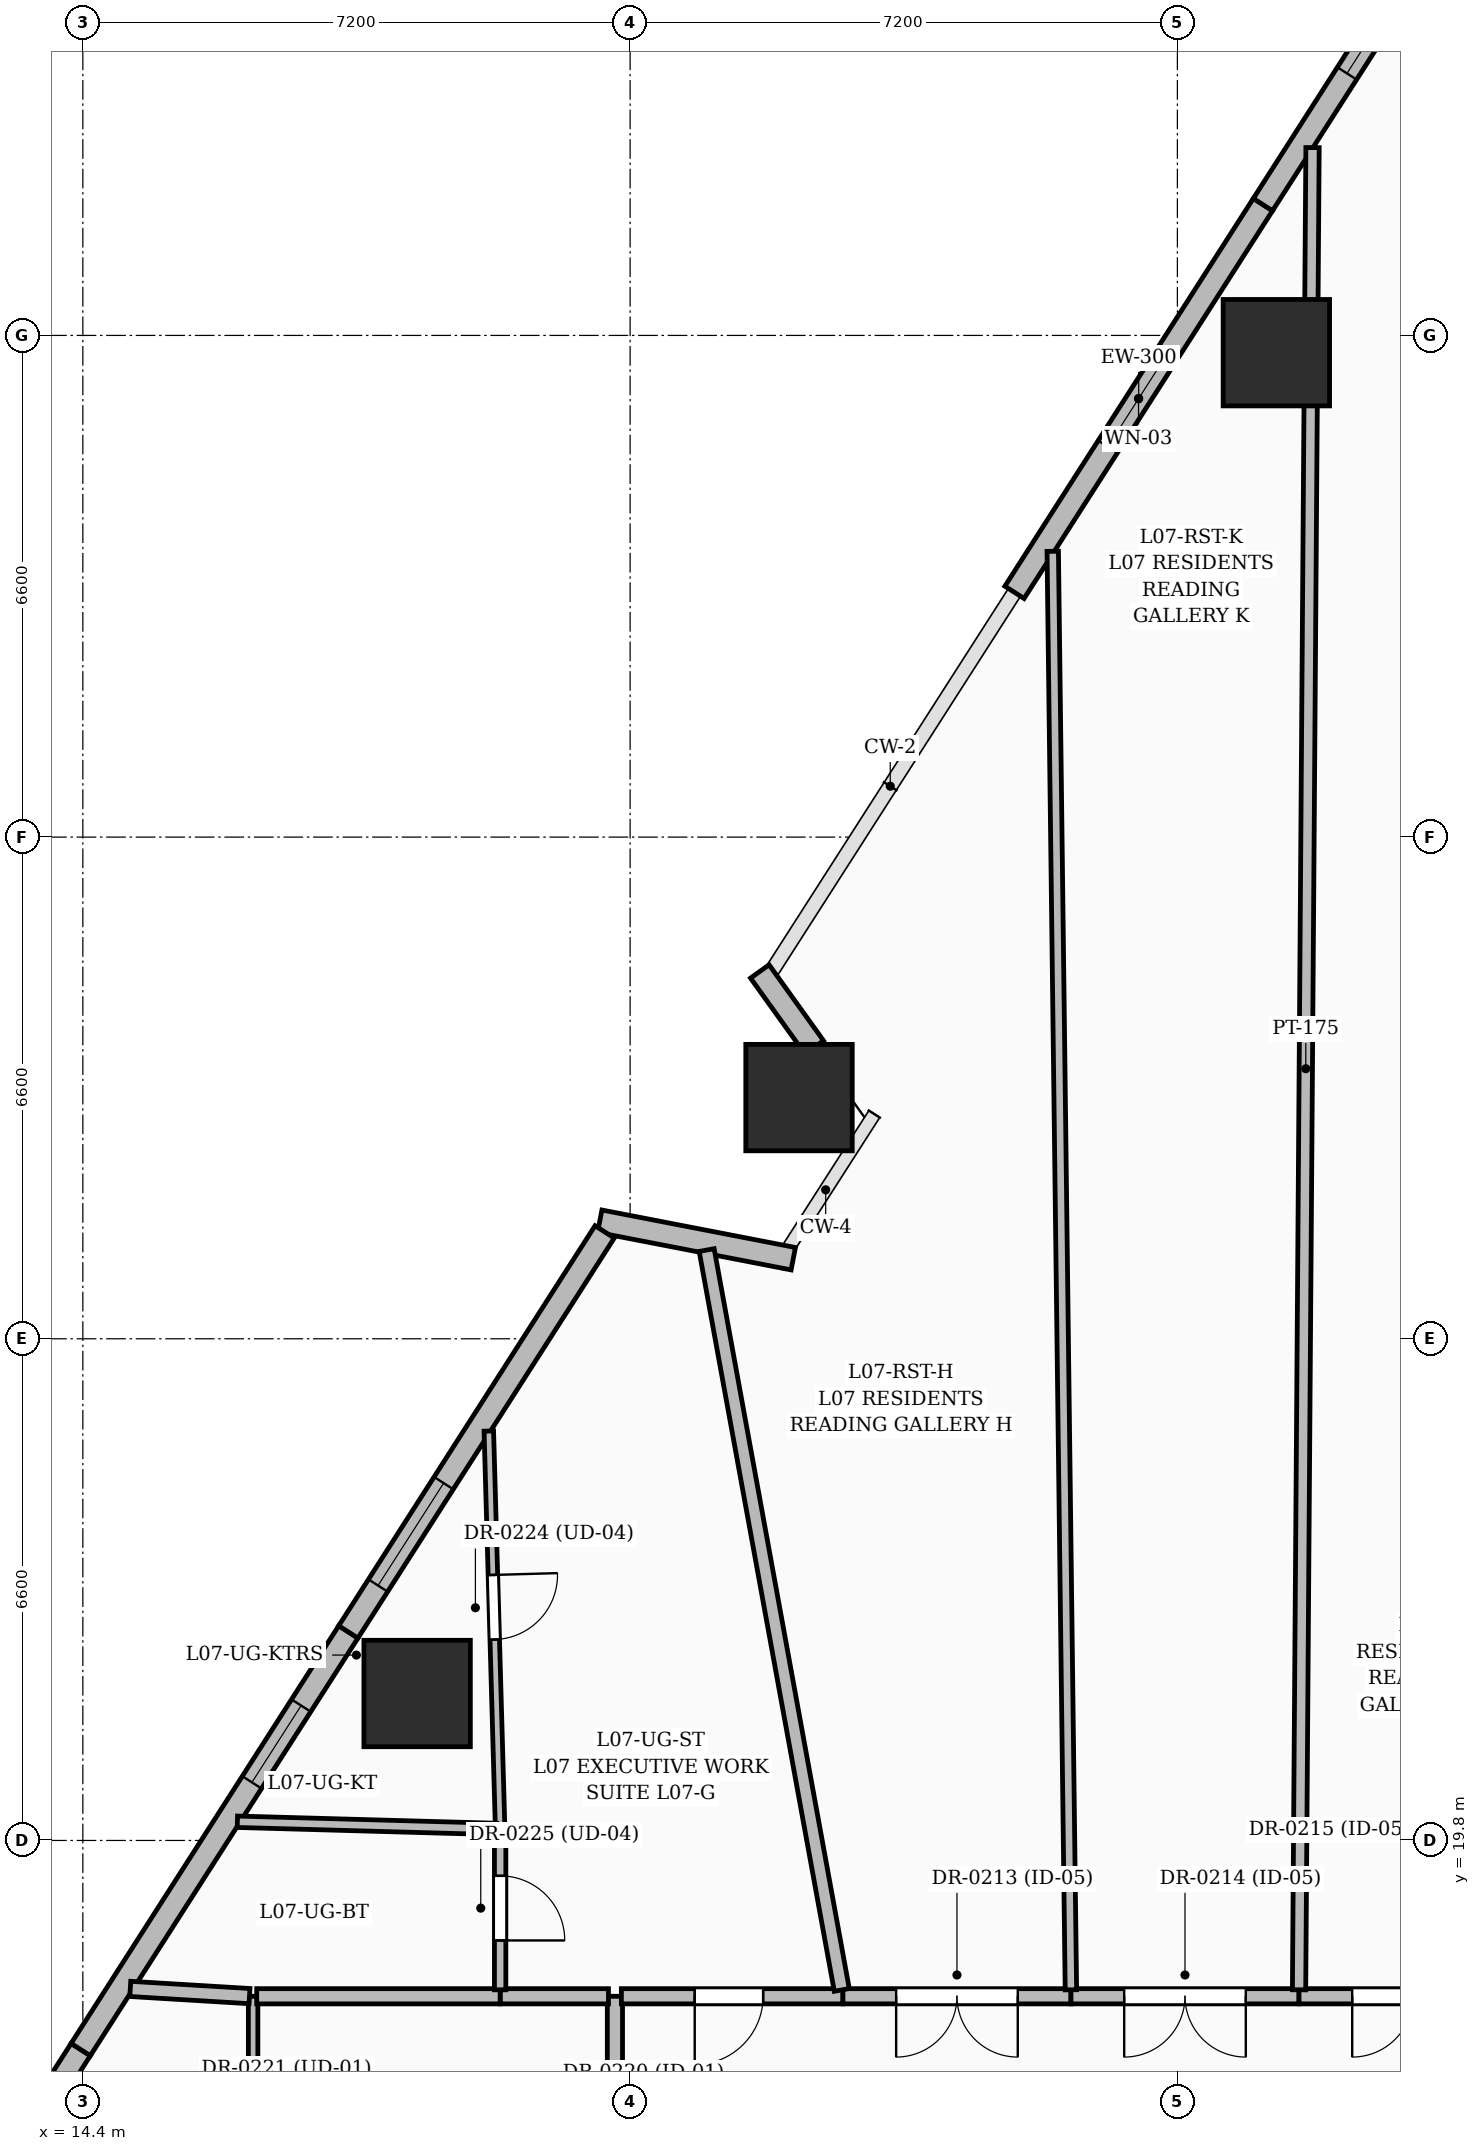
"""IFC4 building model, lengths in metres.
Left out: names, types, materials, properties, quantities, classifications, styles, units other than length and angle.
Written with IfcOpenShell. Run it as: python <this file> out.ifc"""

import sys

from ifc_helpers import new_model, si_unit, direction, frame, frame_2d, origin, origin_2d, place, context, subcontext, project, spatial, rectangle, extrude, element, fill, save


model = new_model("IFC4")
c1 = context("Model", 3, precision=1e-05, world=origin(), true_north=direction((0.0, 1.0)))
c2 = subcontext(c1, "Body", "Model", "MODEL_VIEW")
j1 = project(units=[si_unit("LENGTHUNIT", "METRE"), si_unit("PLANEANGLEUNIT", "RADIAN")], contexts=[c1])
p1 = place(None, origin())
s1 = spatial("IfcSite", under=j1, at=p1, CompositionType="ELEMENT")
p2 = place(p1, origin())
s2 = spatial("IfcBuilding", under=s1, at=p2, CompositionType="ELEMENT")
p3 = place(p2, frame((0.0, 0.0, 35.4)))
s3 = spatial("IfcBuildingStorey", under=s2, at=p3, CompositionType="ELEMENT", Elevation=35.4)
for number, where, z_axis, x_axis in (
    (1, (30.102, 39.373, 0.0), (0.0, 0.0, 1.0), (1.0, 0.0, 0.0)),
    (2, (23.822, 29.573, 0.0), (0.0, 0.0, 1.0), (1.0, 0.0, 0.0)),
    (3, (18.798, 21.733, 0.0), (0.0, 0.0, 1.0), (1.0, 0.0, 0.0)),
):
    element("IfcColumn", number, at=place(p3, frame(where, z_axis=z_axis, x_axis=x_axis)), inside=s3, PredefinedType="COLUMN", context=c2, shape_type="SweptSolid", body=[
        extrude(rectangle(XDim=1.4, YDim=1.4, at=origin_2d()), origin(), (0.0, 0.0, 1.0), 3.6),
    ])
p4 = place(p3, frame((21.201, 27.947, 0.0), z_axis=(0.0, 0.0, 1.0), x_axis=(0.981746971615, -0.190191702567, 0.0)))
e4 = element("IfcWall", 4, at=p4, inside=s3, PredefinedType="SOLIDWALL", context=c2, shape_type="SweptSolid", body=[
    extrude(rectangle(XDim=2.593, YDim=0.3, at=frame_2d((1.296, 0.0))), origin(), (0.0, 0.0, 1.0), 2.375),
])
p5 = place(p3, frame((24.022, 30.235, 0.0), z_axis=(0.0, 0.0, 1.0), x_axis=(-0.583004903736, 0.812468634607, 0.0)))
e5 = element("IfcWall", 5, at=p5, inside=s3, PredefinedType="SOLIDWALL", context=c2, shape_type="SweptSolid", body=[
    extrude(rectangle(XDim=1.228, YDim=0.3, at=frame_2d((0.614, 0.0))), origin(), (0.0, 0.0, 1.0), 2.375),
])
p6 = place(p3, frame((26.657, 36.22, 0.0), z_axis=(0.0, 0.0, 1.0), x_axis=(0.539506453767, 0.841981464371, 0.0)))
e6 = element("IfcWall", 6, at=p6, inside=s3, PredefinedType="SOLIDWALL", context=c2, shape_type="SweptSolid", body=[
    extrude(rectangle(XDim=6.058, YDim=0.3, at=frame_2d((3.029, 0.0))), origin(), (0.0, 0.0, 1.0), 3.35),
])
p7 = place(p6, frame((2.275, 0.0, 0.6)))
e7 = element("IfcOpeningElement", 7, at=p7, cuts=e6, PredefinedType="OPENING", context=c2, shape_type="SweptSolid", body=[
    extrude(rectangle(XDim=1.5, YDim=2.1, at=frame_2d((0.75, 1.05))), frame((0.0, 0.16, 0.0), z_axis=(0.0, -1.0, 0.0), x_axis=(1.0, 0.0, 0.0)), (0.0, 0.0, 1.0), 0.32),
])
p8 = place(p3, frame((29.925, 41.321, 0.0), z_axis=(0.0, 0.0, 1.0), x_axis=(0.53953502124, 0.841963158847, 0.0)))
e8 = element("IfcWall", 8, at=p8, inside=s3, PredefinedType="SOLIDWALL", context=c2, shape_type="SweptSolid", body=[
    extrude(rectangle(XDim=6.059, YDim=0.3, at=frame_2d((3.029, 0.0))), origin(), (0.0, 0.0, 1.0), 3.35),
])
p9 = place(p8, frame((2.05, 0.0, 0.8)))
e9 = element("IfcOpeningElement", 9, at=p9, cuts=e8, PredefinedType="OPENING", context=c2, shape_type="SweptSolid", body=[
    extrude(rectangle(XDim=1.2, YDim=1.8, at=frame_2d((0.6, 0.9))), frame((0.0, 0.16, 0.0), z_axis=(0.0, -1.0, 0.0), x_axis=(1.0, 0.0, 0.0)), (0.0, 0.0, 1.0), 0.32),
])
p10 = place(p3, frame((10.851, 11.555, 0.0), z_axis=(0.0, 0.0, 1.0), x_axis=(0.539526045631, 0.841968910403, 0.0)))
e10 = element("IfcWall", 10, at=p10, inside=s3, PredefinedType="SOLIDWALL", context=c2, shape_type="SweptSolid", body=[
    extrude(rectangle(XDim=6.526, YDim=0.3, at=frame_2d((3.263, 0.0))), origin(), (0.0, 0.0, 1.0), 3.35),
])
p11 = place(p10, frame((2.1, 0.0, 0.55)))
e11 = element("IfcOpeningElement", 11, at=p11, cuts=e10, PredefinedType="OPENING", context=c2, shape_type="SweptSolid", body=[
    extrude(rectangle(XDim=2.1, YDim=2.4, at=frame_2d((1.05, 1.2))), frame((0.0, 0.16, 0.0), z_axis=(0.0, -1.0, 0.0), x_axis=(1.0, 0.0, 0.0)), (0.0, 0.0, 1.0), 0.32),
])
p12 = place(p3, frame((14.372, 17.049, 0.0), z_axis=(0.0, 0.0, 1.0), x_axis=(0.539499522652, 0.841985905498, 0.0)))
e12 = element("IfcWall", 12, at=p12, inside=s3, PredefinedType="SOLIDWALL", context=c2, shape_type="SweptSolid", body=[
    extrude(rectangle(XDim=6.525, YDim=0.3, at=frame_2d((3.263, 0.0))), origin(), (0.0, 0.0, 1.0), 3.35),
])
p13 = place(p12, frame((4.175, 0.0, 0.8)))
e13 = element("IfcOpeningElement", 13, at=p13, cuts=e12, PredefinedType="OPENING", context=c2, shape_type="SweptSolid", body=[
    extrude(rectangle(XDim=1.2, YDim=1.8, at=frame_2d((0.6, 0.9))), frame((0.0, 0.16, 0.0), z_axis=(0.0, -1.0, 0.0), x_axis=(1.0, 0.0, 0.0)), (0.0, 0.0, 1.0), 0.32),
])
p14 = place(p3, frame((17.893, 22.543, 0.0), z_axis=(0.0, 0.0, 1.0), x_axis=(0.539539053693, 0.841960574813, 0.0)))
e14 = element("IfcWall", 14, at=p14, inside=s3, PredefinedType="SOLIDWALL", context=c2, shape_type="SweptSolid", body=[
    extrude(rectangle(XDim=6.251, YDim=0.3, at=frame_2d((3.125, 0.0))), origin(), (0.0, 0.0, 1.0), 3.35),
])
p15 = place(p14, frame((0.725, 0.0, 0.55)))
e15 = element("IfcOpeningElement", 15, at=p15, cuts=e14, PredefinedType="OPENING", context=c2, shape_type="SweptSolid", body=[
    extrude(rectangle(XDim=1.6, YDim=2.2, at=frame_2d((0.8, 1.1))), frame((0.0, 0.16, 0.0), z_axis=(0.0, -1.0, 0.0), x_axis=(1.0, 0.0, 0.0)), (0.0, 0.0, 1.0), 0.32),
])
p16 = place(p3, frame((21.4, 17.75, 0.0), z_axis=(0.0, 0.0, 1.0), x_axis=(0.0, -1.0, 0.0)))
e16 = element("IfcWall", 16, at=p16, inside=s3, PredefinedType="PARTITIONING", context=c2, shape_type="SweptSolid", body=[
    extrude(rectangle(XDim=4.17, YDim=0.2, at=frame_2d((2.085, 0.0))), origin(), (0.0, 0.0, 1.0), 2.712),
])
p17 = place(p16, frame((1.643, 0.0, 0.0)))
e17 = element("IfcOpeningElement", 17, at=p17, cuts=e16, PredefinedType="OPENING", context=c2, shape_type="SweptSolid", body=[
    extrude(rectangle(XDim=1.0, YDim=2.2, at=frame_2d((0.5, 1.1))), frame((0.0, 0.11, 0.0), z_axis=(0.0, -1.0, 0.0), x_axis=(1.0, 0.0, 0.0)), (0.0, 0.0, 1.0), 0.22),
])
p18 = place(p3, frame((24.4, 17.75, 0.0), z_axis=(0.0, 0.0, 1.0), x_axis=(-1.0, 0.0, 0.0)))
e18 = element("IfcWall", 18, at=p18, inside=s3, PredefinedType="PARTITIONING", context=c2, shape_type="SweptSolid", body=[
    extrude(rectangle(XDim=2.915, YDim=0.2, at=frame_2d((1.458, 0.0))), origin(), (0.0, 0.0, 1.0), 2.228),
])
p19 = place(p18, frame((1.05, 0.0, 0.0)))
e19 = element("IfcOpeningElement", 19, at=p19, cuts=e18, PredefinedType="OPENING", context=c2, shape_type="SweptSolid", body=[
    extrude(rectangle(XDim=0.9, YDim=2.1, at=frame_2d((0.45, 1.05))), frame((0.0, 0.11, 0.0), z_axis=(0.0, -1.0, 0.0), x_axis=(1.0, 0.0, 0.0)), (0.0, 0.0, 1.0), 0.22),
])
p20 = place(p3, frame((27.4, 17.75, 0.0), z_axis=(0.0, 0.0, 1.0), x_axis=(-1.0, 0.0, 0.0)))
e20 = element("IfcWall", 20, at=p20, inside=s3, PredefinedType="PARTITIONING", context=c2, shape_type="SweptSolid", body=[
    extrude(rectangle(XDim=3.0, YDim=0.2, at=frame_2d((1.5, 0.0))), origin(), (0.0, 0.0, 1.0), 2.712),
])
p21 = place(p20, frame((0.7, 0.0, 0.0)))
e21 = element("IfcOpeningElement", 21, at=p21, cuts=e20, PredefinedType="OPENING", context=c2, shape_type="SweptSolid", body=[
    extrude(rectangle(XDim=1.6, YDim=2.3, at=frame_2d((0.8, 1.15))), frame((0.0, 0.11, 0.0), z_axis=(0.0, -1.0, 0.0), x_axis=(1.0, 0.0, 0.0)), (0.0, 0.0, 1.0), 0.22),
])
p22 = place(p3, frame((30.4, 17.75, 0.0), z_axis=(0.0, 0.0, 1.0), x_axis=(-1.0, 0.0, 0.0)))
e22 = element("IfcWall", 22, at=p22, inside=s3, PredefinedType="PARTITIONING", context=c2, shape_type="SweptSolid", body=[
    extrude(rectangle(XDim=3.0, YDim=0.2, at=frame_2d((1.5, 0.0))), origin(), (0.0, 0.0, 1.0), 3.35),
])
p23 = place(p22, frame((0.7, 0.0, 0.0)))
e23 = element("IfcOpeningElement", 23, at=p23, cuts=e22, PredefinedType="OPENING", context=c2, shape_type="SweptSolid", body=[
    extrude(rectangle(XDim=1.6, YDim=2.3, at=frame_2d((0.8, 1.15))), frame((0.0, 0.11, 0.0), z_axis=(0.0, -1.0, 0.0), x_axis=(1.0, 0.0, 0.0)), (0.0, 0.0, 1.0), 0.22),
])
p24 = place(p3, frame((33.4, 17.75, 0.0), z_axis=(0.0, 0.0, 1.0), x_axis=(-1.0, 0.0, 0.0)))
e24 = element("IfcWall", 24, at=p24, inside=s3, PredefinedType="PARTITIONING", context=c2, shape_type="SweptSolid", body=[
    extrude(rectangle(XDim=3.0, YDim=0.2, at=frame_2d((1.5, 0.0))), origin(), (0.0, 0.0, 1.0), 3.35),
])
p25 = place(p24, frame((0.7, 0.0, 0.0)))
e25 = element("IfcOpeningElement", 25, at=p25, cuts=e24, PredefinedType="OPENING", context=c2, shape_type="SweptSolid", body=[
    extrude(rectangle(XDim=1.6, YDim=2.3, at=frame_2d((0.8, 1.15))), frame((0.0, 0.11, 0.0), z_axis=(0.0, -1.0, 0.0), x_axis=(1.0, 0.0, 0.0)), (0.0, 0.0, 1.0), 0.22),
])
p26 = place(p3, frame((16.64, 17.75, 0.0), z_axis=(0.0, 0.0, 1.0), x_axis=(0.0, -1.0, 0.0)))
e26 = element("IfcWall", 26, at=p26, inside=s3, PredefinedType="PARTITIONING", context=c2, shape_type="SweptSolid", body=[
    extrude(rectangle(XDim=4.11, YDim=0.125, at=frame_2d((2.055, 0.0))), origin(), (0.0, 0.0, 1.0), 3.35),
])
p27 = place(p26, frame((1.669, 0.0, 0.0)))
e27 = element("IfcOpeningElement", 27, at=p27, cuts=e26, PredefinedType="OPENING", context=c2, shape_type="SweptSolid", body=[
    extrude(rectangle(XDim=0.95, YDim=2.2, at=frame_2d((0.475, 1.1))), frame((0.0, 0.072, 0.0), z_axis=(0.0, -1.0, 0.0), x_axis=(1.0, 0.0, 0.0)), (0.0, 0.0, 1.0), 0.145),
])
p28 = place(p3, frame((21.315, 17.75, 0.0), z_axis=(0.0, 0.0, 1.0), x_axis=(-1.0, 0.0, 0.0)))
e28 = element("IfcWall", 28, at=p28, inside=s3, PredefinedType="PARTITIONING", context=c2, shape_type="SweptSolid", body=[
    extrude(rectangle(XDim=1.425, YDim=0.2, at=frame_2d((0.712, 0.0))), origin(), (0.0, 0.0, 1.0), 2.712),
])
p29 = place(p3, frame((19.89, 17.75, 0.0), z_axis=(0.0, 0.0, 1.0), x_axis=(-1.0, 0.0, 0.0)))
e29 = element("IfcWall", 29, at=p29, inside=s3, PredefinedType="PARTITIONING", context=c2, shape_type="SweptSolid", body=[
    extrude(rectangle(XDim=3.202, YDim=0.2, at=frame_2d((1.601, 0.0))), origin(), (0.0, 0.0, 1.0), 3.35),
])
p30 = place(p3, frame((16.593, 17.752, 0.0), z_axis=(0.0, 0.0, 1.0), x_axis=(-0.998181550188, 0.060279290502, 0.0)))
e30 = element("IfcWall", 30, at=p30, inside=s3, PredefinedType="PARTITIONING", context=c2, shape_type="SweptSolid", body=[
    extrude(rectangle(XDim=1.572, YDim=0.2, at=frame_2d((0.786, 0.0))), origin(), (0.0, 0.0, 1.0), 2.37),
])
p31 = place(p3, frame((19.741, 25.186, 0.0), z_axis=(0.0, 0.0, 1.0), x_axis=(0.028430709053, -0.999595765689, 0.0)))
e31 = element("IfcWall", 31, at=p31, inside=s3, PredefinedType="PARTITIONING", context=c2, shape_type="SweptSolid", body=[
    extrude(rectangle(XDim=5.238, YDim=0.125, at=frame_2d((2.619, 0.0))), origin(), (0.0, 0.0, 1.0), 2.228),
])
p32 = place(p31, frame((1.894, 0.0, 0.0)))
e32 = element("IfcOpeningElement", 32, at=p32, cuts=e31, PredefinedType="OPENING", context=c2, shape_type="SweptSolid", body=[
    extrude(rectangle(XDim=0.85, YDim=2.1, at=frame_2d((0.425, 1.05))), frame((0.0, 0.072, 0.0), z_axis=(0.0, -1.0, 0.0), x_axis=(1.0, 0.0, 0.0)), (0.0, 0.0, 1.0), 0.145),
])
p33 = place(p3, frame((19.89, 19.95, 0.0), z_axis=(0.0, 0.0, 1.0), x_axis=(0.0, -1.0, 0.0)))
e33 = element("IfcWall", 33, at=p33, inside=s3, PredefinedType="PARTITIONING", context=c2, shape_type="SweptSolid", body=[
    extrude(rectangle(XDim=2.115, YDim=0.15, at=frame_2d((1.058, 0.0))), origin(), (0.0, 0.0, 1.0), 3.35),
])
p34 = place(p33, frame((0.615, 0.0, 0.0)))
e34 = element("IfcOpeningElement", 34, at=p34, cuts=e33, PredefinedType="OPENING", context=c2, shape_type="SweptSolid", body=[
    extrude(rectangle(XDim=0.85, YDim=2.1, at=frame_2d((0.425, 1.05))), frame((0.0, 0.085, 0.0), z_axis=(0.0, -1.0, 0.0), x_axis=(1.0, 0.0, 0.0)), (0.0, 0.0, 1.0), 0.17),
])
p35 = place(p3, frame((24.385, 17.833, 0.0), z_axis=(0.0, 0.0, 1.0), x_axis=(-0.179680097859, 0.98372509495, 0.0)))
e35 = element("IfcWall", 35, at=p35, inside=s3, PredefinedType="PARTITIONING", context=c2, shape_type="SweptSolid", body=[
    extrude(rectangle(XDim=9.895, YDim=0.2, at=frame_2d((4.947, 0.0))), origin(), (0.0, 0.0, 1.0), 2.37),
])
p36 = place(p3, frame((16.433, 20.046, 0.0), z_axis=(0.0, 0.0, 1.0), x_axis=(0.999614255068, -0.027773027638, 0.0)))
e36 = element("IfcWall", 36, at=p36, inside=s3, PredefinedType="PARTITIONING", context=c2, shape_type="SweptSolid", body=[
    extrude(rectangle(XDim=3.411, YDim=0.15, at=frame_2d((1.705, 0.0))), origin(), (0.0, 0.0, 1.0), 2.37),
])
p37 = place(p3, frame((27.399, 17.835, 0.0), z_axis=(0.0, 0.0, 1.0), x_axis=(-0.012641377926, 0.99992009459, 0.0)))
e37 = element("IfcWall", 37, at=p37, inside=s3, PredefinedType="PARTITIONING", context=c2, shape_type="SweptSolid", body=[
    extrude(rectangle(XDim=18.927, YDim=0.15, at=frame_2d((9.463, 0.0))), origin(), (0.0, 0.0, 1.0), 2.228),
])
p38 = place(p3, frame((30.401, 17.835, 0.0), z_axis=(0.0, 0.0, 1.0), x_axis=(0.007313118493, 0.999973258791, 0.0)))
e38 = element("IfcWall", 38, at=p38, inside=s3, PredefinedType="PARTITIONING", context=c2, shape_type="SweptSolid", body=[
    extrude(rectangle(XDim=24.237, YDim=0.175, at=frame_2d((12.118, 0.0))), origin(), (0.0, 0.0, 1.0), 2.228),
])
p39 = place(p7, origin())
e39 = element("IfcWindow", 39, at=p39, inside=s3, PartitioningType="SINGLE_PANEL", PredefinedType="WINDOW", context=c2, shape_type="SweptSolid", body=[
    extrude(rectangle(XDim=1.5, YDim=2.1, at=frame_2d((0.75, 1.05))), frame((0.0, 0.03, 0.0), z_axis=(0.0, -1.0, 0.0), x_axis=(1.0, 0.0, 0.0)), (0.0, 0.0, 1.0), 0.06),
])
fill(e7, e39)
p40 = place(p9, origin())
e40 = element("IfcWindow", 40, at=p40, inside=s3, PartitioningType="SINGLE_PANEL", PredefinedType="WINDOW", context=c2, shape_type="SweptSolid", body=[
    extrude(rectangle(XDim=1.2, YDim=1.8, at=frame_2d((0.6, 0.9))), frame((0.0, 0.03, 0.0), z_axis=(0.0, -1.0, 0.0), x_axis=(1.0, 0.0, 0.0)), (0.0, 0.0, 1.0), 0.06),
])
fill(e9, e40)
p41 = place(p13, origin())
e41 = element("IfcWindow", 41, at=p41, inside=s3, PartitioningType="SINGLE_PANEL", PredefinedType="WINDOW", context=c2, shape_type="SweptSolid", body=[
    extrude(rectangle(XDim=1.2, YDim=1.8, at=frame_2d((0.6, 0.9))), frame((0.0, 0.03, 0.0), z_axis=(0.0, -1.0, 0.0), x_axis=(1.0, 0.0, 0.0)), (0.0, 0.0, 1.0), 0.06),
])
fill(e13, e41)
p42 = place(p15, origin())
e42 = element("IfcWindow", 42, at=p42, inside=s3, PartitioningType="SINGLE_PANEL", PredefinedType="WINDOW", context=c2, shape_type="SweptSolid", body=[
    extrude(rectangle(XDim=1.6, YDim=2.2, at=frame_2d((0.8, 1.1))), frame((0.0, 0.03, 0.0), z_axis=(0.0, -1.0, 0.0), x_axis=(1.0, 0.0, 0.0)), (0.0, 0.0, 1.0), 0.06),
])
fill(e15, e42)
p43 = place(p21, origin())
e43 = element("IfcDoor", 43, at=p43, inside=s3, OperationType="DOUBLE_DOOR_SINGLE_SWING", PredefinedType="DOOR", context=c2, shape_type="SweptSolid", body=[
    extrude(rectangle(XDim=1.6, YDim=2.3, at=frame_2d((0.8, 1.15))), frame((0.0, 0.025, 0.0), z_axis=(0.0, -1.0, 0.0), x_axis=(1.0, 0.0, 0.0)), (0.0, 0.0, 1.0), 0.05),
])
fill(e21, e43)
p44 = place(p23, origin())
e44 = element("IfcDoor", 44, at=p44, inside=s3, OperationType="DOUBLE_DOOR_SINGLE_SWING", PredefinedType="DOOR", context=c2, shape_type="SweptSolid", body=[
    extrude(rectangle(XDim=1.6, YDim=2.3, at=frame_2d((0.8, 1.15))), frame((0.0, 0.025, 0.0), z_axis=(0.0, -1.0, 0.0), x_axis=(1.0, 0.0, 0.0)), (0.0, 0.0, 1.0), 0.05),
])
fill(e23, e44)
p45 = place(p25, origin())
e45 = element("IfcDoor", 45, at=p45, inside=s3, OperationType="DOUBLE_DOOR_SINGLE_SWING", PredefinedType="DOOR", context=c2, shape_type="SweptSolid", body=[
    extrude(rectangle(XDim=1.6, YDim=2.3, at=frame_2d((0.8, 1.15))), frame((0.0, 0.025, 0.0), z_axis=(0.0, -1.0, 0.0), x_axis=(1.0, 0.0, 0.0)), (0.0, 0.0, 1.0), 0.05),
])
fill(e25, e45)
p46 = place(p19, origin())
e46 = element("IfcDoor", 46, at=p46, inside=s3, OperationType="SINGLE_SWING_RIGHT", PredefinedType="DOOR", context=c2, shape_type="SweptSolid", body=[
    extrude(rectangle(XDim=0.9, YDim=2.1, at=frame_2d((0.45, 1.05))), frame((0.0, 0.025, 0.0), z_axis=(0.0, -1.0, 0.0), x_axis=(1.0, 0.0, 0.0)), (0.0, 0.0, 1.0), 0.05),
])
fill(e19, e46)
p47 = place(p32, origin())
e47 = element("IfcDoor", 47, at=p47, inside=s3, OperationType="SINGLE_SWING_LEFT", PredefinedType="DOOR", context=c2, shape_type="SweptSolid", body=[
    extrude(rectangle(XDim=0.85, YDim=2.1, at=frame_2d((0.425, 1.05))), frame((0.0, 0.025, 0.0), z_axis=(0.0, -1.0, 0.0), x_axis=(1.0, 0.0, 0.0)), (0.0, 0.0, 1.0), 0.05),
])
fill(e32, e47)
p48 = place(p34, origin())
e48 = element("IfcDoor", 48, at=p48, inside=s3, OperationType="SINGLE_SWING_RIGHT", PredefinedType="DOOR", context=c2, shape_type="SweptSolid", body=[
    extrude(rectangle(XDim=0.85, YDim=2.1, at=frame_2d((0.425, 1.05))), frame((0.0, 0.025, 0.0), z_axis=(0.0, -1.0, 0.0), x_axis=(1.0, 0.0, 0.0)), (0.0, 0.0, 1.0), 0.05),
])
fill(e34, e48)
save(model, sys.argv[1])
